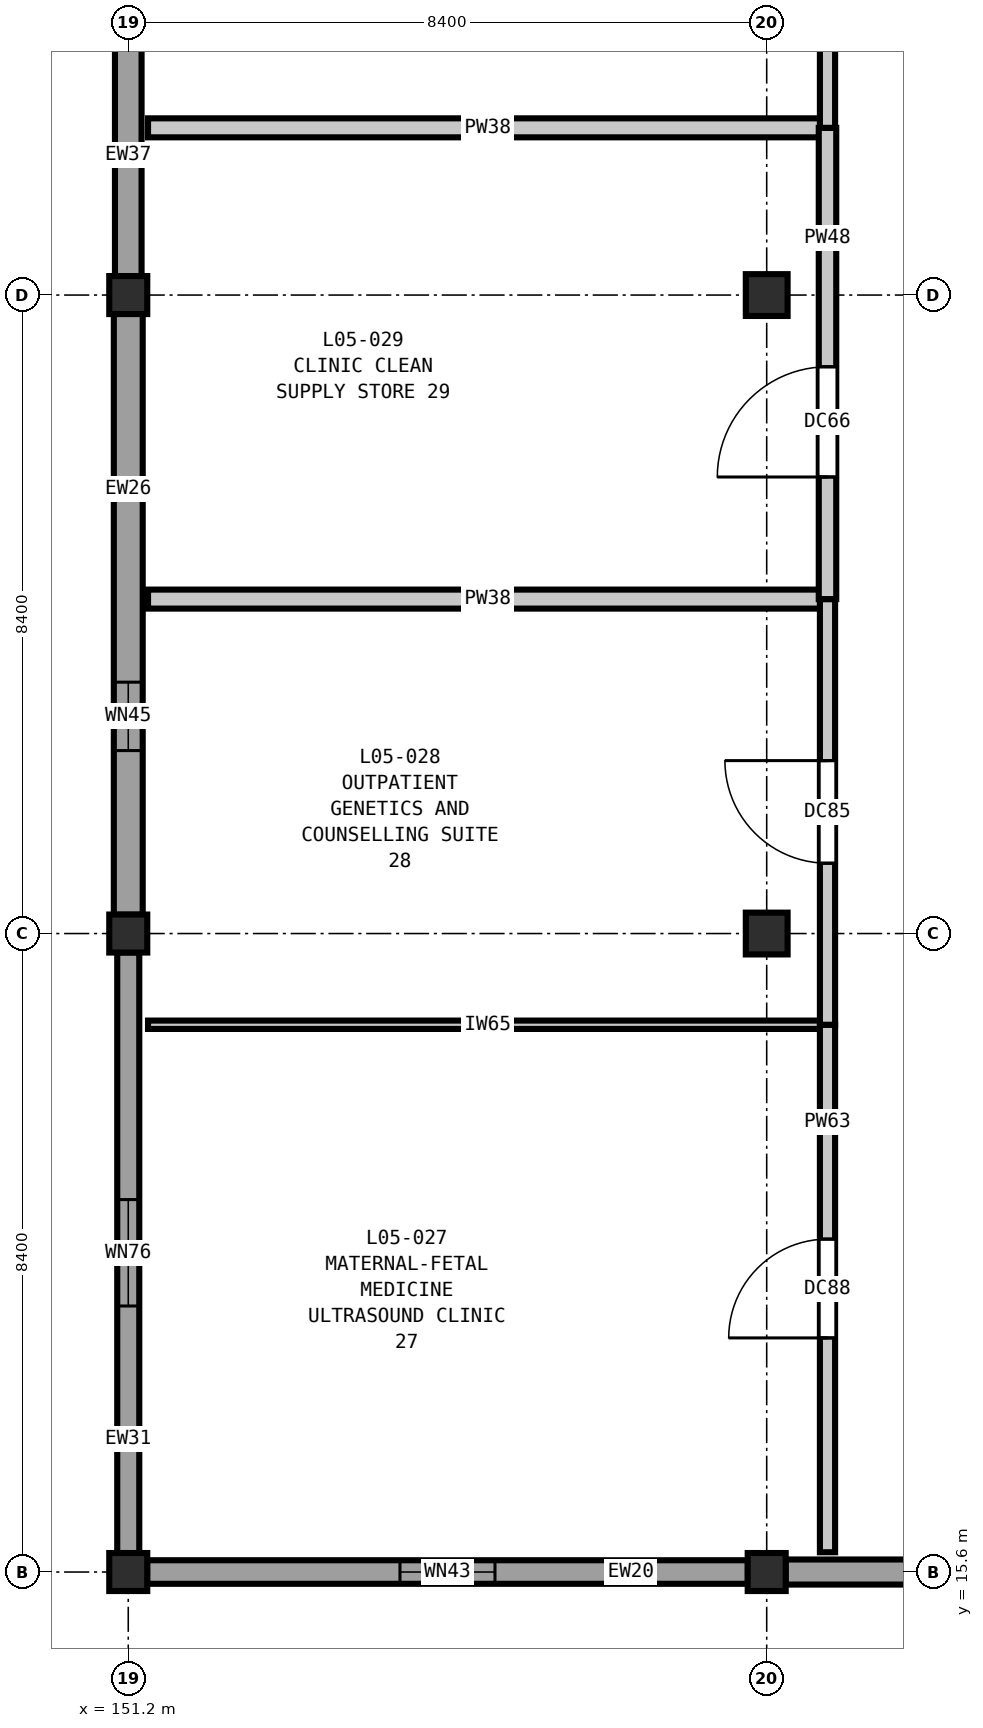
"""IFC4 building model, lengths in metres.
Left out: names, types, materials, properties, quantities, classifications, styles, units other than length and angle.
Written with IfcOpenShell. Run it as: python <this file> out.ifc"""

import sys

from ifc_helpers import new_model, si_unit, direction, frame, frame_2d, origin, origin_2d, place, context, subcontext, project, spatial, rectangle, extrude, element, fill, save


model = new_model("IFC4")
c1 = context("Model", 3, precision=1e-05, world=origin(), true_north=direction((0.0, 1.0)))
c2 = subcontext(c1, "Body", "Model", "MODEL_VIEW")
j1 = project(units=[si_unit("LENGTHUNIT", "METRE"), si_unit("PLANEANGLEUNIT", "RADIAN")], contexts=[c1])
p1 = place(None, origin())
s1 = spatial("IfcSite", under=j1, at=p1, CompositionType="ELEMENT")
p2 = place(p1, origin())
s2 = spatial("IfcBuilding", under=s1, at=p2, CompositionType="ELEMENT")
p3 = place(p2, frame((0.0, 0.0, 24.6)))
s3 = spatial("IfcBuildingStorey", under=s2, at=p3, CompositionType="ELEMENT", Elevation=24.6)
for number, where, z_axis, x_axis in (
    (1, (151.2, 15.6, 0.0), (0.0, 0.0, 1.0), (1.0, 0.0, 0.0)),
    (2, (151.2, 24.0, 0.0), (0.0, 0.0, 1.0), (1.0, 0.0, 0.0)),
    (3, (151.2, 32.4, 0.0), (0.0, 0.0, 1.0), (1.0, 0.0, 0.0)),
    (4, (159.6, 15.6, 0.0), (0.0, 0.0, 1.0), (1.0, 0.0, 0.0)),
):
    element("IfcColumn", number, at=place(p3, frame(where, z_axis=z_axis, x_axis=x_axis)), inside=s3, PredefinedType="COLUMN", context=c2, shape_type="SweptSolid", body=[
        extrude(rectangle(XDim=0.5, YDim=0.5, at=origin_2d()), origin(), (0.0, 0.0, 1.0), 4.2),
    ])
for number, where, z_axis, x_axis in (
    (5, (159.6, 24.0, 0.0), (0.0, 0.0, 1.0), (1.0, 0.0, 0.0)),
    (6, (159.6, 32.4, 0.0), (0.0, 0.0, 1.0), (1.0, 0.0, 0.0)),
):
    element("IfcColumn", number, at=place(p3, frame(where, z_axis=z_axis, x_axis=x_axis)), inside=s3, PredefinedType="COLUMN", context=c2, shape_type="SweptSolid", body=[
        extrude(rectangle(XDim=0.55, YDim=0.55, at=origin_2d()), origin(), (0.0, 0.0, 1.0), 4.2),
    ])
p4 = place(p3, frame((167.752, 15.6, 0.0), z_axis=(0.0, 0.0, 1.0), x_axis=(-1.0, 0.0, 0.0)))
e7 = element("IfcWall", 7, at=p4, inside=s3, PredefinedType="SOLIDWALL", context=c2, shape_type="SweptSolid", body=[
    extrude(rectangle(XDim=7.904, YDim=0.33, at=frame_2d((3.952, 0.0))), origin(), (0.0, 0.0, 1.0), 3.48),
])
p5 = place(p4, frame((3.377, 0.0, 0.9)))
e8 = element("IfcOpeningElement", 8, at=p5, cuts=e7, PredefinedType="OPENING", context=c2, shape_type="SweptSolid", body=[
    extrude(rectangle(XDim=1.15, YDim=1.4, at=frame_2d((0.575, 0.7))), frame((0.0, 0.175, 0.0), z_axis=(0.0, -1.0, 0.0), x_axis=(1.0, 0.0, 0.0)), (0.0, 0.0, 1.0), 0.35),
])
p6 = place(p3, frame((159.352, 15.6, 0.0), z_axis=(0.0, 0.0, 1.0), x_axis=(-1.0, 0.0, 0.0)))
e9 = element("IfcWall", 9, at=p6, inside=s3, PredefinedType="SOLIDWALL", context=c2, shape_type="SweptSolid", body=[
    extrude(rectangle(XDim=7.904, YDim=0.31, at=frame_2d((3.952, 0.0))), origin(), (0.0, 0.0, 1.0), 3.48),
])
p7 = place(p6, frame((3.327, 0.0, 0.9)))
e10 = element("IfcOpeningElement", 10, at=p7, cuts=e9, PredefinedType="OPENING", context=c2, shape_type="SweptSolid", body=[
    extrude(rectangle(XDim=1.25, YDim=1.4, at=frame_2d((0.625, 0.7))), frame((0.0, 0.165, 0.0), z_axis=(0.0, -1.0, 0.0), x_axis=(1.0, 0.0, 0.0)), (0.0, 0.0, 1.0), 0.33),
])
p8 = place(p3, frame((151.2, 15.848, 0.0), z_axis=(0.0, 0.0, 1.0), x_axis=(0.0, 1.0, 0.0)))
e11 = element("IfcWall", 11, at=p8, inside=s3, PredefinedType="SOLIDWALL", context=c2, shape_type="SweptSolid", body=[
    extrude(rectangle(XDim=7.904, YDim=0.29, at=frame_2d((3.952, 0.0))), origin(), (0.0, 0.0, 1.0), 3.48),
])
p9 = place(p8, frame((3.252, 0.0, 0.9)))
e12 = element("IfcOpeningElement", 12, at=p9, cuts=e11, PredefinedType="OPENING", context=c2, shape_type="SweptSolid", body=[
    extrude(rectangle(XDim=1.4, YDim=1.4, at=frame_2d((0.7, 0.7))), frame((0.0, 0.155, 0.0), z_axis=(0.0, -1.0, 0.0), x_axis=(1.0, 0.0, 0.0)), (0.0, 0.0, 1.0), 0.31),
])
p10 = place(p3, frame((151.2, 24.248, 0.0), z_axis=(0.0, 0.0, 1.0), x_axis=(0.0, 1.0, 0.0)))
e13 = element("IfcWall", 13, at=p10, inside=s3, PredefinedType="SOLIDWALL", context=c2, shape_type="SweptSolid", body=[
    extrude(rectangle(XDim=7.904, YDim=0.38, at=frame_2d((3.952, 0.0))), origin(), (0.0, 0.0, 1.0), 3.48),
])
p11 = place(p10, frame((2.159, 0.0, 0.9)))
e14 = element("IfcOpeningElement", 14, at=p11, cuts=e13, PredefinedType="OPENING", context=c2, shape_type="SweptSolid", body=[
    extrude(rectangle(XDim=0.9, YDim=1.55, at=frame_2d((0.45, 0.775))), frame((0.0, 0.2, 0.0), z_axis=(0.0, -1.0, 0.0), x_axis=(1.0, 0.0, 0.0)), (0.0, 0.0, 1.0), 0.4),
])
p12 = place(p3, frame((151.2, 32.648, 0.0), z_axis=(0.0, 0.0, 1.0), x_axis=(0.0, 1.0, 0.0)))
e15 = element("IfcWall", 15, at=p12, inside=s3, PredefinedType="SOLIDWALL", context=c2, shape_type="SweptSolid", body=[
    extrude(rectangle(XDim=7.904, YDim=0.35, at=frame_2d((3.952, 0.0))), origin(), (0.0, 0.0, 1.0), 3.48),
])
p13 = place(p12, frame((3.452, 0.0, 0.9)))
e16 = element("IfcOpeningElement", 16, at=p13, cuts=e15, PredefinedType="OPENING", context=c2, shape_type="SweptSolid", body=[
    extrude(rectangle(XDim=1.0, YDim=1.55, at=frame_2d((0.5, 0.775))), frame((0.0, 0.185, 0.0), z_axis=(0.0, -1.0, 0.0), x_axis=(1.0, 0.0, 0.0)), (0.0, 0.0, 1.0), 0.37),
])
p14 = place(p3, frame((151.46, 22.8, 0.0), z_axis=(0.0, 0.0, 1.0), x_axis=(1.0, 0.0, 0.0)))
e17 = element("IfcWall", 17, at=p14, inside=s3, PredefinedType="PARTITIONING", context=c2, shape_type="SweptSolid", body=[
    extrude(rectangle(XDim=8.94, YDim=0.11, at=frame_2d((4.47, 0.0))), origin(), (0.0, 0.0, 1.0), 3.92),
])
for number, where, z_axis, x_axis in (
    (18, (151.46, 28.4, 0.0), (0.0, 0.0, 1.0), (1.0, 0.0, 0.0)),
    (19, (151.46, 34.6, 0.0), (0.0, 0.0, 1.0), (1.0, 0.0, 0.0)),
):
    element("IfcWall", number, at=place(p3, frame(where, z_axis=z_axis, x_axis=x_axis)), inside=s3, PredefinedType="PARTITIONING", context=c2, shape_type="SweptSolid", body=[
        extrude(rectangle(XDim=8.94, YDim=0.25, at=frame_2d((4.47, 0.0))), origin(), (0.0, 0.0, 1.0), 3.92),
    ])
p15 = place(p3, frame((160.4, 15.86, 0.0), z_axis=(0.0, 0.0, 1.0), x_axis=(0.0, 1.0, 0.0)))
e20 = element("IfcWall", 20, at=p15, inside=s3, PredefinedType="PARTITIONING", context=c2, shape_type="SweptSolid", body=[
    extrude(rectangle(XDim=6.94, YDim=0.2, at=frame_2d((3.47, 0.0))), origin(), (0.0, 0.0, 1.0), 3.92),
])
p16 = place(p15, frame((2.82, 0.0, 0.0)))
e21 = element("IfcOpeningElement", 21, at=p16, cuts=e20, PredefinedType="OPENING", context=c2, shape_type="SweptSolid", body=[
    extrude(rectangle(XDim=1.3, YDim=2.2, at=frame_2d((0.65, 1.1))), frame((0.0, 0.11, 0.0), z_axis=(0.0, -1.0, 0.0), x_axis=(1.0, 0.0, 0.0)), (0.0, 0.0, 1.0), 0.22),
])
p17 = place(p3, frame((160.4, 22.8, 0.0), z_axis=(0.0, 0.0, 1.0), x_axis=(0.0, 1.0, 0.0)))
e22 = element("IfcWall", 22, at=p17, inside=s3, PredefinedType="PARTITIONING", context=c2, shape_type="SweptSolid", body=[
    extrude(rectangle(XDim=5.6, YDim=0.2, at=frame_2d((2.8, 0.0))), origin(), (0.0, 0.0, 1.0), 3.92),
])
p18 = place(p17, frame((2.125, 0.0, 0.0)))
e23 = element("IfcOpeningElement", 23, at=p18, cuts=e22, PredefinedType="OPENING", context=c2, shape_type="SweptSolid", body=[
    extrude(rectangle(XDim=1.35, YDim=2.2, at=frame_2d((0.675, 1.1))), frame((0.0, 0.11, 0.0), z_axis=(0.0, -1.0, 0.0), x_axis=(1.0, 0.0, 0.0)), (0.0, 0.0, 1.0), 0.22),
])
p19 = place(p3, frame((160.4, 28.4, 0.0), z_axis=(0.0, 0.0, 1.0), x_axis=(0.0, 1.0, 0.0)))
e24 = element("IfcWall", 24, at=p19, inside=s3, PredefinedType="PARTITIONING", context=c2, shape_type="SweptSolid", body=[
    extrude(rectangle(XDim=6.2, YDim=0.23, at=frame_2d((3.1, 0.0))), origin(), (0.0, 0.0, 1.0), 3.92),
])
p20 = place(p19, frame((1.606, 0.0, 0.0)))
e25 = element("IfcOpeningElement", 25, at=p20, cuts=e24, PredefinedType="OPENING", context=c2, shape_type="SweptSolid", body=[
    extrude(rectangle(XDim=1.45, YDim=2.25, at=frame_2d((0.725, 1.125))), frame((0.0, 0.125, 0.0), z_axis=(0.0, -1.0, 0.0), x_axis=(1.0, 0.0, 0.0)), (0.0, 0.0, 1.0), 0.25),
])
p21 = place(p3, frame((160.4, 34.6, 0.0), z_axis=(0.0, 0.0, 1.0), x_axis=(0.0, 1.0, 0.0)))
e26 = element("IfcWall", 26, at=p21, inside=s3, PredefinedType="PARTITIONING", context=c2, shape_type="SweptSolid", body=[
    extrude(rectangle(XDim=7.2, YDim=0.2, at=frame_2d((3.6, 0.0))), origin(), (0.0, 0.0, 1.0), 3.92),
])
p22 = place(p21, frame((2.825, 0.0, 0.0)))
e27 = element("IfcOpeningElement", 27, at=p22, cuts=e26, PredefinedType="OPENING", context=c2, shape_type="SweptSolid", body=[
    extrude(rectangle(XDim=1.55, YDim=2.25, at=frame_2d((0.775, 1.125))), frame((0.0, 0.11, 0.0), z_axis=(0.0, -1.0, 0.0), x_axis=(1.0, 0.0, 0.0)), (0.0, 0.0, 1.0), 0.22),
])
p23 = place(p7, origin())
e28 = element("IfcWindow", 28, at=p23, inside=s3, PartitioningType="SINGLE_PANEL", PredefinedType="WINDOW", context=c2, shape_type="SweptSolid", body=[
    extrude(rectangle(XDim=1.25, YDim=1.4, at=frame_2d((0.625, 0.7))), frame((0.0, 0.03, 0.0), z_axis=(0.0, -1.0, 0.0), x_axis=(1.0, 0.0, 0.0)), (0.0, 0.0, 1.0), 0.06),
])
fill(e10, e28)
p24 = place(p9, origin())
e29 = element("IfcWindow", 29, at=p24, inside=s3, PartitioningType="SINGLE_PANEL", PredefinedType="WINDOW", context=c2, shape_type="SweptSolid", body=[
    extrude(rectangle(XDim=1.4, YDim=1.4, at=frame_2d((0.7, 0.7))), frame((0.0, 0.03, 0.0), z_axis=(0.0, -1.0, 0.0), x_axis=(1.0, 0.0, 0.0)), (0.0, 0.0, 1.0), 0.06),
])
fill(e12, e29)
p25 = place(p11, origin())
e30 = element("IfcWindow", 30, at=p25, inside=s3, PartitioningType="SINGLE_PANEL", PredefinedType="WINDOW", context=c2, shape_type="SweptSolid", body=[
    extrude(rectangle(XDim=0.9, YDim=1.55, at=frame_2d((0.45, 0.775))), frame((0.0, 0.03, 0.0), z_axis=(0.0, -1.0, 0.0), x_axis=(1.0, 0.0, 0.0)), (0.0, 0.0, 1.0), 0.06),
])
fill(e14, e30)
p26 = place(p16, origin())
e31 = element("IfcDoor", 31, at=p26, inside=s3, OperationType="SINGLE_SWING_LEFT", PredefinedType="DOOR", context=c2, shape_type="SweptSolid", body=[
    extrude(rectangle(XDim=1.3, YDim=2.2, at=frame_2d((0.65, 1.1))), frame((0.0, 0.025, 0.0), z_axis=(0.0, -1.0, 0.0), x_axis=(1.0, 0.0, 0.0)), (0.0, 0.0, 1.0), 0.05),
])
fill(e21, e31)
p27 = place(p18, origin())
e32 = element("IfcDoor", 32, at=p27, inside=s3, OperationType="SINGLE_SWING_RIGHT", PredefinedType="DOOR", context=c2, shape_type="SweptSolid", body=[
    extrude(rectangle(XDim=1.35, YDim=2.2, at=frame_2d((0.675, 1.1))), frame((0.0, 0.025, 0.0), z_axis=(0.0, -1.0, 0.0), x_axis=(1.0, 0.0, 0.0)), (0.0, 0.0, 1.0), 0.05),
])
fill(e23, e32)
p28 = place(p20, origin())
e33 = element("IfcDoor", 33, at=p28, inside=s3, OperationType="SINGLE_SWING_LEFT", PredefinedType="DOOR", context=c2, shape_type="SweptSolid", body=[
    extrude(rectangle(XDim=1.45, YDim=2.25, at=frame_2d((0.725, 1.125))), frame((0.0, 0.025, 0.0), z_axis=(0.0, -1.0, 0.0), x_axis=(1.0, 0.0, 0.0)), (0.0, 0.0, 1.0), 0.05),
])
fill(e25, e33)
save(model, sys.argv[1])
